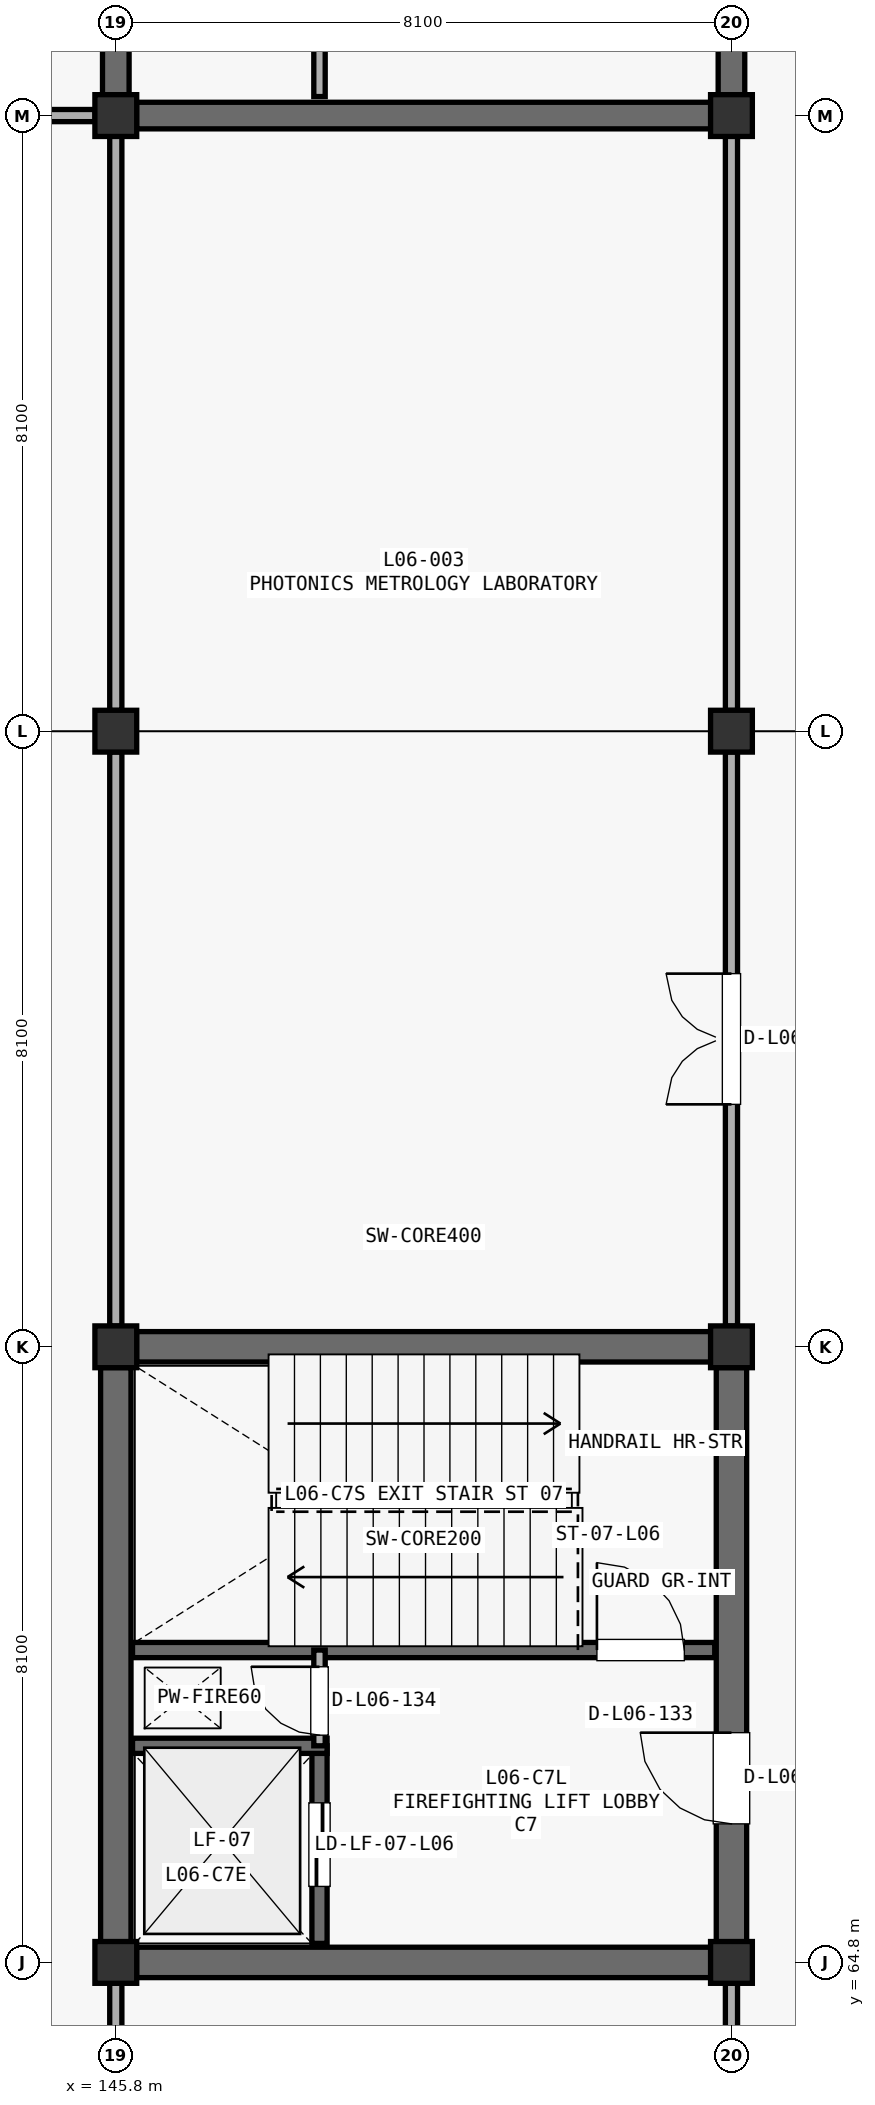
"""IFC4 building model, lengths in metres.
Left out: names, types, materials, properties, quantities, classifications, styles, units other than length and angle.
Written with IfcOpenShell. Run it as: python <this file> out.ifc"""

import sys

from ifc_helpers import new_model, si_unit, direction, frame, frame_2d, origin, origin_2d, place, context, subcontext, project, spatial, rectangle, extrude, element, fill, save


model = new_model("IFC4")
c1 = context("Model", 3, precision=1e-05, world=origin(), true_north=direction((0.0, 1.0)))
c2 = subcontext(c1, "Body", "Model", "MODEL_VIEW")
j1 = project(units=[si_unit("LENGTHUNIT", "METRE"), si_unit("PLANEANGLEUNIT", "RADIAN")], contexts=[c1])
p1 = place(None, origin())
s1 = spatial("IfcSite", under=j1, at=p1, CompositionType="ELEMENT")
p2 = place(p1, origin())
s2 = spatial("IfcBuilding", under=s1, at=p2, CompositionType="ELEMENT")
p3 = place(p2, frame((0.0, 0.0, 27.37)))
s3 = spatial("IfcBuildingStorey", under=s2, at=p3, CompositionType="ELEMENT", Elevation=27.37)
for number, where, z_axis, x_axis in (
    (1, (145.8, 64.8, 0.0), (0.0, 0.0, 1.0), (1.0, 0.0, 0.0)),
    (2, (145.8, 72.9, 0.0), (0.0, 0.0, 1.0), (1.0, 0.0, 0.0)),
    (3, (145.8, 81.0, 0.0), (0.0, 0.0, 1.0), (1.0, 0.0, 0.0)),
    (4, (145.8, 89.1, 0.0), (0.0, 0.0, 1.0), (1.0, 0.0, 0.0)),
    (5, (153.9, 64.8, 0.0), (0.0, 0.0, 1.0), (1.0, 0.0, 0.0)),
    (6, (153.9, 72.9, 0.0), (0.0, 0.0, 1.0), (1.0, 0.0, 0.0)),
    (7, (153.9, 81.0, 0.0), (0.0, 0.0, 1.0), (1.0, 0.0, 0.0)),
    (8, (153.9, 89.1, 0.0), (0.0, 0.0, 1.0), (1.0, 0.0, 0.0)),
):
    element("IfcColumn", number, at=place(p3, frame(where, z_axis=z_axis, x_axis=x_axis)), inside=s3, PredefinedType="COLUMN", context=c2, shape_type="SweptSolid", body=[
        extrude(rectangle(XDim=0.55, YDim=0.55, at=origin_2d()), origin(), (0.0, 0.0, 1.0), 4.42),
    ])
for number, where, z_axis, x_axis in (
    (9, (146.073, 72.9, 0.0), (0.0, 0.0, 1.0), (1.0, 0.0, 0.0)),
    (10, (145.8, 65.073, 0.0), (0.0, 0.0, 1.0), (0.0, 1.0, 0.0)),
):
    element("IfcWall", number, at=place(p3, frame(where, z_axis=z_axis, x_axis=x_axis)), inside=s3, PredefinedType="SHEAR", context=c2, shape_type="SweptSolid", body=[
        extrude(rectangle(XDim=7.554, YDim=0.4, at=frame_2d((3.777, 0.0))), origin(), (0.0, 0.0, 1.0), 4.162),
    ])
p4 = place(p3, frame((153.9, 65.073, 0.0), z_axis=(0.0, 0.0, 1.0), x_axis=(0.0, 1.0, 0.0)))
e11 = element("IfcWall", 11, at=p4, inside=s3, PredefinedType="SHEAR", context=c2, shape_type="SweptSolid", body=[
    extrude(rectangle(XDim=7.554, YDim=0.4, at=frame_2d((3.777, 0.0))), origin(), (0.0, 0.0, 1.0), 4.162),
])
p5 = place(p4, frame((1.55, 0.0, 0.0)))
e12 = element("IfcOpeningElement", 12, at=p5, cuts=e11, PredefinedType="OPENING", context=c2, shape_type="SweptSolid", body=[
    extrude(rectangle(XDim=1.2, YDim=2.2, at=frame_2d((0.6, 1.1))), frame((0.0, 0.21, 0.0), z_axis=(0.0, -1.0, 0.0), x_axis=(1.0, 0.0, 0.0)), (0.0, 0.0, 1.0), 0.42),
])
p6 = place(p3, frame((146.073, 64.8, 0.0), z_axis=(0.0, 0.0, 1.0), x_axis=(1.0, 0.0, 0.0)))
e13 = element("IfcWall", 13, at=p6, inside=s3, PredefinedType="SHEAR", context=c2, shape_type="SweptSolid", body=[
    extrude(rectangle(XDim=7.554, YDim=0.4, at=frame_2d((3.777, 0.0))), origin(), (0.0, 0.0, 1.0), 4.162),
])
p7 = place(p3, frame((146.02, 68.91, 0.0), z_axis=(0.0, 0.0, 1.0), x_axis=(1.0, 0.0, 0.0)))
e14 = element("IfcWall", 14, at=p7, inside=s3, PredefinedType="SHEAR", context=c2, shape_type="SweptSolid", body=[
    extrude(rectangle(XDim=7.66, YDim=0.2, at=frame_2d((3.83, 0.0))), origin(), (0.0, 0.0, 1.0), 4.162),
])
p8 = place(p7, frame((6.11, 0.0, 0.0)))
e15 = element("IfcOpeningElement", 15, at=p8, cuts=e14, PredefinedType="OPENING", context=c2, shape_type="SweptSolid", body=[
    extrude(rectangle(XDim=1.15, YDim=2.2, at=frame_2d((0.575, 1.1))), frame((0.0, 0.11, 0.0), z_axis=(0.0, -1.0, 0.0), x_axis=(1.0, 0.0, 0.0)), (0.0, 0.0, 1.0), 0.22),
])
p9 = place(p3, frame((148.48, 65.05, 0.0), z_axis=(0.0, 0.0, 1.0), x_axis=(0.0, 1.0, 0.0)))
e16 = element("IfcWall", 16, at=p9, inside=s3, PredefinedType="SHEAR", context=c2, shape_type="SweptSolid", body=[
    extrude(rectangle(XDim=2.6, YDim=0.2, at=frame_2d((1.3, 0.0))), origin(), (0.0, 0.0, 1.0), 4.162),
])
p10 = place(p9, frame((0.75, 0.0, 0.0)))
e17 = element("IfcOpeningElement", 17, at=p10, cuts=e16, PredefinedType="OPENING", context=c2, shape_type="SweptSolid", body=[
    extrude(rectangle(XDim=1.1, YDim=2.2, at=frame_2d((0.55, 1.1))), frame((0.0, 0.11, 0.0), z_axis=(0.0, -1.0, 0.0), x_axis=(1.0, 0.0, 0.0)), (0.0, 0.0, 1.0), 0.22),
])
p11 = place(p3, frame((146.02, 67.65, 0.0), z_axis=(0.0, 0.0, 1.0), x_axis=(1.0, 0.0, 0.0)))
e18 = element("IfcWall", 18, at=p11, inside=s3, PredefinedType="SHEAR", context=c2, shape_type="SweptSolid", body=[
    extrude(rectangle(XDim=2.56, YDim=0.2, at=frame_2d((1.28, 0.0))), origin(), (0.0, 0.0, 1.0), 4.162),
])
p12 = place(p3, frame((148.48, 67.65, 0.0), z_axis=(0.0, 0.0, 1.0), x_axis=(0.0, 1.0, 0.0)))
e19 = element("IfcWall", 19, at=p12, inside=s3, PredefinedType="PARTITIONING", context=c2, shape_type="SweptSolid", body=[
    extrude(rectangle(XDim=1.26, YDim=0.15, at=frame_2d((0.63, 0.0))), origin(), (0.0, 0.0, 1.0), 4.162),
])
p13 = place(p12, frame((0.14, 0.0, 0.0)))
e20 = element("IfcOpeningElement", 20, at=p13, cuts=e19, PredefinedType="OPENING", context=c2, shape_type="SweptSolid", body=[
    extrude(rectangle(XDim=0.9, YDim=2.15, at=frame_2d((0.45, 1.075))), frame((0.0, 0.085, 0.0), z_axis=(0.0, -1.0, 0.0), x_axis=(1.0, 0.0, 0.0)), (0.0, 0.0, 1.0), 0.17),
])
p14 = place(p3, frame((145.8, 89.373, 0.0), z_axis=(0.0, 0.0, 1.0), x_axis=(0.0, 1.0, 0.0)))
e21 = element("IfcWall", 21, at=p14, inside=s3, PredefinedType="SHEAR", context=c2, shape_type="SweptSolid", body=[
    extrude(rectangle(XDim=7.554, YDim=0.35, at=frame_2d((3.777, 0.0))), origin(), (0.0, 0.0, 1.0), 4.162),
])
p15 = place(p3, frame((153.9, 89.373, 0.0), z_axis=(0.0, 0.0, 1.0), x_axis=(0.0, 1.0, 0.0)))
e22 = element("IfcWall", 22, at=p15, inside=s3, PredefinedType="SHEAR", context=c2, shape_type="SweptSolid", body=[
    extrude(rectangle(XDim=7.554, YDim=0.35, at=frame_2d((3.777, 0.0))), origin(), (0.0, 0.0, 1.0), 4.162),
])
p16 = place(p15, frame((1.55, 0.0, 0.0)))
e23 = element("IfcOpeningElement", 23, at=p16, cuts=e22, PredefinedType="OPENING", context=c2, shape_type="SweptSolid", body=[
    extrude(rectangle(XDim=1.2, YDim=2.2, at=frame_2d((0.6, 1.1))), frame((0.0, 0.185, 0.0), z_axis=(0.0, -1.0, 0.0), x_axis=(1.0, 0.0, 0.0)), (0.0, 0.0, 1.0), 0.37),
])
p17 = place(p3, frame((146.073, 89.1, 0.0), z_axis=(0.0, 0.0, 1.0), x_axis=(1.0, 0.0, 0.0)))
e24 = element("IfcWall", 24, at=p17, inside=s3, PredefinedType="SHEAR", context=c2, shape_type="SweptSolid", body=[
    extrude(rectangle(XDim=7.554, YDim=0.35, at=frame_2d((3.777, 0.0))), origin(), (0.0, 0.0, 1.0), 4.162),
])
p18 = place(p3, frame((148.48, 89.35, 0.0), z_axis=(0.0, 0.0, 1.0), x_axis=(0.0, 1.0, 0.0)))
e25 = element("IfcWall", 25, at=p18, inside=s3, PredefinedType="PARTITIONING", context=c2, shape_type="SweptSolid", body=[
    extrude(rectangle(XDim=2.6, YDim=0.15, at=frame_2d((1.3, 0.0))), origin(), (0.0, 0.0, 1.0), 4.162),
])
p19 = place(p18, frame((0.8, 0.0, 0.0)))
e26 = element("IfcOpeningElement", 26, at=p19, cuts=e25, PredefinedType="OPENING", context=c2, shape_type="SweptSolid", body=[
    extrude(rectangle(XDim=0.95, YDim=2.15, at=frame_2d((0.475, 1.075))), frame((0.0, 0.085, 0.0), z_axis=(0.0, -1.0, 0.0), x_axis=(1.0, 0.0, 0.0)), (0.0, 0.0, 1.0), 0.17),
])
p20 = place(p3, frame((145.8, 56.973, 0.0), z_axis=(0.0, 0.0, 1.0), x_axis=(0.0, 1.0, 0.0)))
e27 = element("IfcWall", 27, at=p20, inside=s3, PredefinedType="PARTITIONING", context=c2, shape_type="SweptSolid", body=[
    extrude(rectangle(XDim=7.554, YDim=0.16, at=frame_2d((3.777, 0.0))), origin(), (0.0, 0.0, 1.0), 3.412),
])
p21 = place(p20, frame((3.027, 0.0, 0.0)))
e28 = element("IfcOpeningElement", 28, at=p21, cuts=e27, PredefinedType="OPENING", context=c2, shape_type="SweptSolid", body=[
    extrude(rectangle(XDim=1.5, YDim=2.2, at=frame_2d((0.75, 1.1))), frame((0.0, 0.09, 0.0), z_axis=(0.0, -1.0, 0.0), x_axis=(1.0, 0.0, 0.0)), (0.0, 0.0, 1.0), 0.18),
])
p22 = place(p3, frame((145.8, 73.173, 0.0), z_axis=(0.0, 0.0, 1.0), x_axis=(0.0, 1.0, 0.0)))
e29 = element("IfcWall", 29, at=p22, inside=s3, PredefinedType="PARTITIONING", context=c2, shape_type="SweptSolid", body=[
    extrude(rectangle(XDim=7.554, YDim=0.16, at=frame_2d((3.777, 0.0))), origin(), (0.0, 0.0, 1.0), 3.562),
])
p23 = place(p3, frame((145.8, 81.273, 0.0), z_axis=(0.0, 0.0, 1.0), x_axis=(0.0, 1.0, 0.0)))
e30 = element("IfcWall", 30, at=p23, inside=s3, PredefinedType="PARTITIONING", context=c2, shape_type="SweptSolid", body=[
    extrude(rectangle(XDim=7.554, YDim=0.16, at=frame_2d((3.777, 0.0))), origin(), (0.0, 0.0, 1.0), 3.312),
])
p24 = place(p3, frame((137.973, 89.1, 0.0), z_axis=(0.0, 0.0, 1.0), x_axis=(1.0, 0.0, 0.0)))
e31 = element("IfcWall", 31, at=p24, inside=s3, PredefinedType="PARTITIONING", context=c2, shape_type="SweptSolid", body=[
    extrude(rectangle(XDim=7.554, YDim=0.16, at=frame_2d((3.777, 0.0))), origin(), (0.0, 0.0, 1.0), 3.412),
])
p25 = place(p3, frame((153.9, 73.173, 0.0), z_axis=(0.0, 0.0, 1.0), x_axis=(0.0, 1.0, 0.0)))
e32 = element("IfcWall", 32, at=p25, inside=s3, PredefinedType="PARTITIONING", context=c2, shape_type="SweptSolid", body=[
    extrude(rectangle(XDim=7.554, YDim=0.16, at=frame_2d((3.777, 0.0))), origin(), (0.0, 0.0, 1.0), 3.212),
])
p26 = place(p25, frame((2.917, 0.0, 0.0)))
e33 = element("IfcOpeningElement", 33, at=p26, cuts=e32, PredefinedType="OPENING", context=c2, shape_type="SweptSolid", body=[
    extrude(rectangle(XDim=1.72, YDim=2.3, at=frame_2d((0.86, 1.15))), frame((0.0, 0.09, 0.0), z_axis=(0.0, -1.0, 0.0), x_axis=(1.0, 0.0, 0.0)), (0.0, 0.0, 1.0), 0.18),
])
p27 = place(p3, frame((153.9, 81.273, 0.0), z_axis=(0.0, 0.0, 1.0), x_axis=(0.0, 1.0, 0.0)))
e34 = element("IfcWall", 34, at=p27, inside=s3, PredefinedType="PARTITIONING", context=c2, shape_type="SweptSolid", body=[
    extrude(rectangle(XDim=7.554, YDim=0.16, at=frame_2d((3.777, 0.0))), origin(), (0.0, 0.0, 1.0), 3.412),
])
p28 = place(p3, frame((153.9, 56.973, 0.0), z_axis=(0.0, 0.0, 1.0), x_axis=(0.0, 1.0, 0.0)))
e35 = element("IfcWall", 35, at=p28, inside=s3, PredefinedType="PARTITIONING", context=c2, shape_type="SweptSolid", body=[
    extrude(rectangle(XDim=7.554, YDim=0.16, at=frame_2d((3.777, 0.0))), origin(), (0.0, 0.0, 1.0), 3.562),
])
p29 = place(p28, frame((2.987, 0.0, 0.0)))
e36 = element("IfcOpeningElement", 36, at=p29, cuts=e35, PredefinedType="OPENING", context=c2, shape_type="SweptSolid", body=[
    extrude(rectangle(XDim=1.58, YDim=2.2, at=frame_2d((0.79, 1.1))), frame((0.0, 0.09, 0.0), z_axis=(0.0, -1.0, 0.0), x_axis=(1.0, 0.0, 0.0)), (0.0, 0.0, 1.0), 0.18),
])
p30 = place(p5, origin())
e37 = element("IfcDoor", 37, at=p30, inside=s3, OperationType="SINGLE_SWING_RIGHT", PredefinedType="DOOR", context=c2, shape_type="SweptSolid", body=[
    extrude(rectangle(XDim=1.2, YDim=2.2, at=frame_2d((0.6, 1.1))), frame((0.0, 0.025, 0.0), z_axis=(0.0, -1.0, 0.0), x_axis=(1.0, 0.0, 0.0)), (0.0, 0.0, 1.0), 0.05),
])
fill(e12, e37)
p31 = place(p8, origin())
e38 = element("IfcDoor", 38, at=p31, inside=s3, OperationType="SINGLE_SWING_LEFT", PredefinedType="DOOR", context=c2, shape_type="SweptSolid", body=[
    extrude(rectangle(XDim=1.15, YDim=2.2, at=frame_2d((0.575, 1.1))), frame((0.0, 0.025, 0.0), z_axis=(0.0, -1.0, 0.0), x_axis=(1.0, 0.0, 0.0)), (0.0, 0.0, 1.0), 0.05),
])
fill(e15, e38)
p32 = place(p10, origin())
e39 = element("IfcDoor", 39, at=p32, inside=s3, OperationType="SLIDING_TO_LEFT", PredefinedType="DOOR", context=c2, shape_type="SweptSolid", body=[
    extrude(rectangle(XDim=1.1, YDim=2.2, at=frame_2d((0.55, 1.1))), frame((0.0, 0.025, 0.0), z_axis=(0.0, -1.0, 0.0), x_axis=(1.0, 0.0, 0.0)), (0.0, 0.0, 1.0), 0.05),
])
fill(e17, e39)
p33 = place(p13, origin())
e40 = element("IfcDoor", 40, at=p33, inside=s3, OperationType="SINGLE_SWING_RIGHT", PredefinedType="DOOR", context=c2, shape_type="SweptSolid", body=[
    extrude(rectangle(XDim=0.9, YDim=2.15, at=frame_2d((0.45, 1.075))), frame((0.0, 0.025, 0.0), z_axis=(0.0, -1.0, 0.0), x_axis=(1.0, 0.0, 0.0)), (0.0, 0.0, 1.0), 0.05),
])
fill(e20, e40)
p34 = place(p26, origin())
e41 = element("IfcDoor", 41, at=p34, inside=s3, OperationType="DOUBLE_SWING_LEFT", PredefinedType="DOOR", context=c2, shape_type="SweptSolid", body=[
    extrude(rectangle(XDim=1.72, YDim=2.3, at=frame_2d((0.86, 1.15))), frame((0.0, 0.025, 0.0), z_axis=(0.0, -1.0, 0.0), x_axis=(1.0, 0.0, 0.0)), (0.0, 0.0, 1.0), 0.05),
])
fill(e33, e41)
save(model, sys.argv[1])
